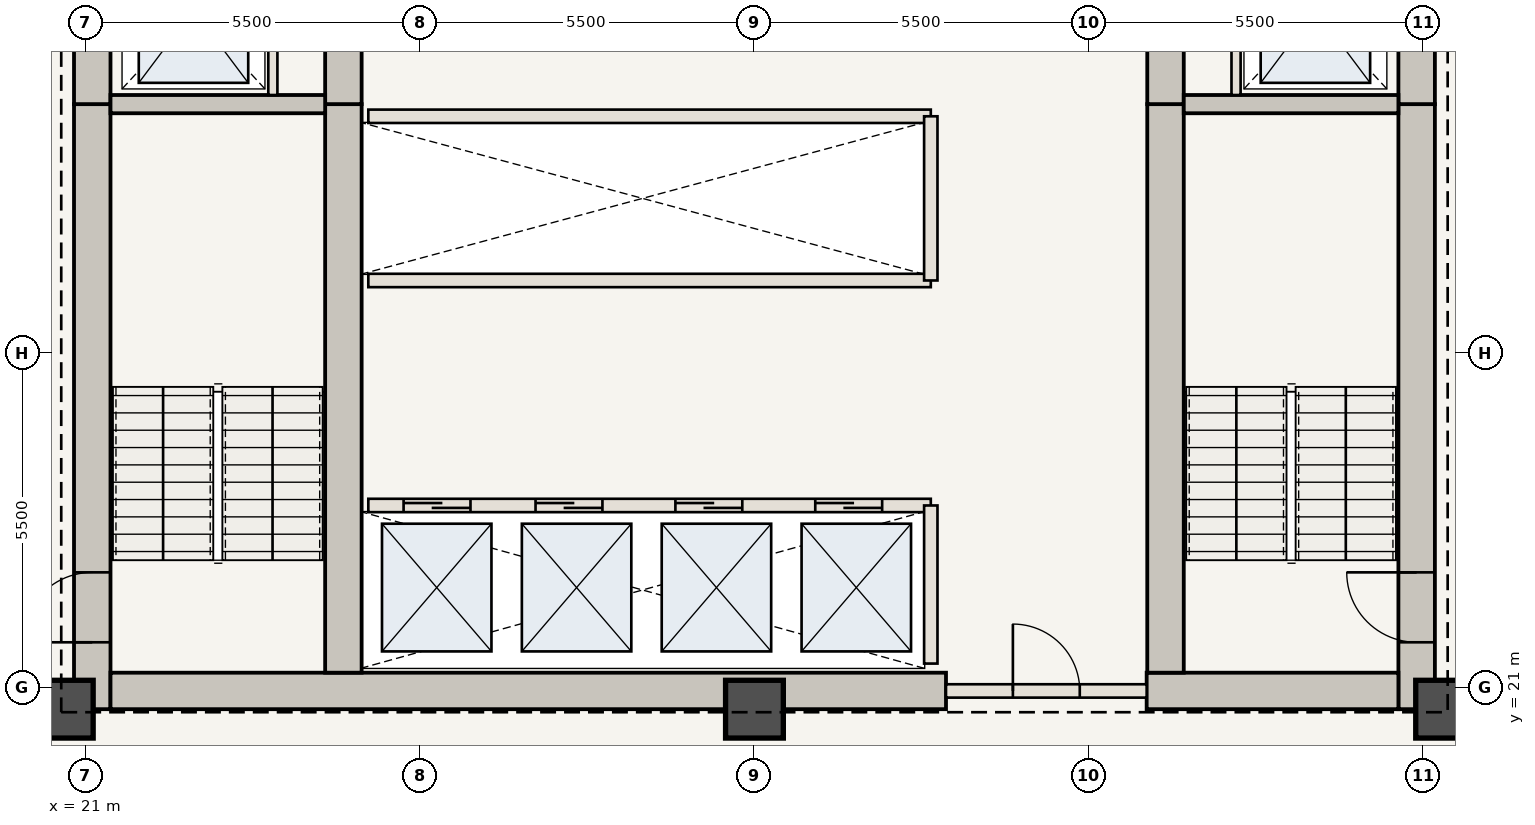
"""IFC4 building model, lengths in metres.
Left out: names, types, materials, properties, quantities, classifications, styles, units other than length and angle.
Written with IfcOpenShell. Run it as: python <this file> out.ifc"""

import sys

from ifc_helpers import new_model, si_unit, direction, frame, frame_2d, origin, origin_2d, place, context, subcontext, project, spatial, rectangle, extrude, element, fill, save


model = new_model("IFC4")
c1 = context("Model", 3, precision=1e-05, world=origin(), true_north=direction((0.0, 1.0)))
c2 = subcontext(c1, "Body", "Model", "MODEL_VIEW")
j1 = project(units=[si_unit("LENGTHUNIT", "METRE"), si_unit("PLANEANGLEUNIT", "RADIAN")], contexts=[c1])
p1 = place(None, origin())
s1 = spatial("IfcSite", under=j1, at=p1, CompositionType="ELEMENT")
p2 = place(p1, origin())
s2 = spatial("IfcBuilding", under=s1, at=p2, CompositionType="ELEMENT")
p3 = place(p2, frame((0.0, 0.0, 168.35)))
s3 = spatial("IfcBuildingStorey", under=s2, at=p3, CompositionType="ELEMENT", Elevation=168.35)
p4 = place(p3, frame((21.11, 20.65, 0.0), z_axis=(0.0, 0.0, 1.0), x_axis=(0.0, 1.0, 0.0)))
e1 = element("IfcWall", 1, at=p4, inside=s3, PredefinedType="SHEAR", context=c2, shape_type="SweptSolid", body=[
    extrude(rectangle(XDim=9.95, YDim=0.6, at=frame_2d((4.975, 0.0))), origin(), (0.0, 0.0, 1.0), 3.85),
])
p5 = place(p4, frame((1.1, 0.0, 0.0)))
e2 = element("IfcOpeningElement", 2, at=p5, cuts=e1, PredefinedType="OPENING", context=c2, shape_type="SweptSolid", body=[
    extrude(rectangle(XDim=1.15, YDim=2.15, at=frame_2d((0.575, 1.075))), frame((0.0, 0.31, 0.0), z_axis=(0.0, -1.0, 0.0), x_axis=(1.0, 0.0, 0.0)), (0.0, 0.0, 1.0), 0.62),
])
p6 = place(p3, frame((21.11, 30.6, 0.0), z_axis=(0.0, 0.0, 1.0), x_axis=(0.0, 1.0, 0.0)))
e3 = element("IfcWall", 3, at=p6, inside=s3, PredefinedType="SHEAR", context=c2, shape_type="SweptSolid", body=[
    extrude(rectangle(XDim=12.7, YDim=0.6, at=frame_2d((6.35, 0.0))), origin(), (0.0, 0.0, 1.0), 3.85),
])
p7 = place(p6, frame((4.2, 0.0, 0.0)))
e4 = element("IfcOpeningElement", 4, at=p7, cuts=e3, PredefinedType="OPENING", context=c2, shape_type="SweptSolid", body=[
    extrude(rectangle(XDim=1.1, YDim=2.15, at=frame_2d((0.55, 1.075))), frame((0.0, 0.31, 0.0), z_axis=(0.0, -1.0, 0.0), x_axis=(1.0, 0.0, 0.0)), (0.0, 0.0, 1.0), 0.62),
])
p8 = place(p6, frame((8.05, 0.0, 0.0)))
e5 = element("IfcOpeningElement", 5, at=p8, cuts=e3, PredefinedType="OPENING", context=c2, shape_type="SweptSolid", body=[
    extrude(rectangle(XDim=0.92, YDim=2.1, at=frame_2d((0.46, 1.05))), frame((0.0, 0.31, 0.0), z_axis=(0.0, -1.0, 0.0), x_axis=(1.0, 0.0, 0.0)), (0.0, 0.0, 1.0), 0.62),
])
p9 = place(p6, frame((9.45, 0.0, 0.0)))
e6 = element("IfcOpeningElement", 6, at=p9, cuts=e3, PredefinedType="OPENING", context=c2, shape_type="SweptSolid", body=[
    extrude(rectangle(XDim=0.88, YDim=2.1, at=frame_2d((0.44, 1.05))), frame((0.0, 0.31, 0.0), z_axis=(0.0, -1.0, 0.0), x_axis=(1.0, 0.0, 0.0)), (0.0, 0.0, 1.0), 0.62),
])
p10 = place(p6, frame((10.85, 0.0, 0.0)))
e7 = element("IfcOpeningElement", 7, at=p10, cuts=e3, PredefinedType="OPENING", context=c2, shape_type="SweptSolid", body=[
    extrude(rectangle(XDim=0.88, YDim=2.1, at=frame_2d((0.44, 1.05))), frame((0.0, 0.31, 0.0), z_axis=(0.0, -1.0, 0.0), x_axis=(1.0, 0.0, 0.0)), (0.0, 0.0, 1.0), 0.62),
])
p11 = place(p3, frame((42.89, 20.65, 0.0), z_axis=(0.0, 0.0, 1.0), x_axis=(0.0, 1.0, 0.0)))
e8 = element("IfcWall", 8, at=p11, inside=s3, PredefinedType="SHEAR", context=c2, shape_type="SweptSolid", body=[
    extrude(rectangle(XDim=9.95, YDim=0.6, at=frame_2d((4.975, 0.0))), origin(), (0.0, 0.0, 1.0), 3.85),
])
p12 = place(p11, frame((1.1, 0.0, 0.0)))
e9 = element("IfcOpeningElement", 9, at=p12, cuts=e8, PredefinedType="OPENING", context=c2, shape_type="SweptSolid", body=[
    extrude(rectangle(XDim=1.15, YDim=2.15, at=frame_2d((0.575, 1.075))), frame((0.0, 0.31, 0.0), z_axis=(0.0, -1.0, 0.0), x_axis=(1.0, 0.0, 0.0)), (0.0, 0.0, 1.0), 0.62),
])
p13 = place(p3, frame((42.89, 30.6, 0.0), z_axis=(0.0, 0.0, 1.0), x_axis=(0.0, 1.0, 0.0)))
e10 = element("IfcWall", 10, at=p13, inside=s3, PredefinedType="SHEAR", context=c2, shape_type="SweptSolid", body=[
    extrude(rectangle(XDim=12.7, YDim=0.6, at=frame_2d((6.35, 0.0))), origin(), (0.0, 0.0, 1.0), 3.85),
])
p14 = place(p13, frame((4.2, 0.0, 0.0)))
e11 = element("IfcOpeningElement", 11, at=p14, cuts=e10, PredefinedType="OPENING", context=c2, shape_type="SweptSolid", body=[
    extrude(rectangle(XDim=1.1, YDim=2.15, at=frame_2d((0.55, 1.075))), frame((0.0, 0.31, 0.0), z_axis=(0.0, -1.0, 0.0), x_axis=(1.0, 0.0, 0.0)), (0.0, 0.0, 1.0), 0.62),
])
p15 = place(p13, frame((9.2, 0.0, 0.0)))
e12 = element("IfcOpeningElement", 12, at=p15, cuts=e10, PredefinedType="OPENING", context=c2, shape_type="SweptSolid", body=[
    extrude(rectangle(XDim=0.92, YDim=2.1, at=frame_2d((0.46, 1.05))), frame((0.0, 0.31, 0.0), z_axis=(0.0, -1.0, 0.0), x_axis=(1.0, 0.0, 0.0)), (0.0, 0.0, 1.0), 0.62),
])
p16 = place(p3, frame((21.41, 20.95, 0.0), z_axis=(0.0, 0.0, 1.0), x_axis=(1.0, 0.0, 0.0)))
e13 = element("IfcWall", 13, at=p16, inside=s3, PredefinedType="SHEAR", context=c2, shape_type="SweptSolid", body=[
    extrude(rectangle(XDim=13.74, YDim=0.6, at=frame_2d((6.87, 0.0))), origin(), (0.0, 0.0, 1.0), 3.85),
])
p17 = place(p3, frame((38.45, 20.95, 0.0), z_axis=(0.0, 0.0, 1.0), x_axis=(1.0, 0.0, 0.0)))
e14 = element("IfcWall", 14, at=p17, inside=s3, PredefinedType="SHEAR", context=c2, shape_type="SweptSolid", body=[
    extrude(rectangle(XDim=4.14, YDim=0.6, at=frame_2d((2.07, 0.0))), origin(), (0.0, 0.0, 1.0), 3.85),
])
p18 = place(p3, frame((25.24, 21.25, 0.0), z_axis=(0.0, 0.0, 1.0), x_axis=(0.0, 1.0, 0.0)))
e15 = element("IfcWall", 15, at=p18, inside=s3, PredefinedType="SHEAR", context=c2, shape_type="SweptSolid", body=[
    extrude(rectangle(XDim=9.35, YDim=0.6, at=frame_2d((4.675, 0.0))), origin(), (0.0, 0.0, 1.0), 3.85),
])
p19 = place(p3, frame((25.24, 30.6, 0.0), z_axis=(0.0, 0.0, 1.0), x_axis=(0.0, 1.0, 0.0)))
e16 = element("IfcWall", 16, at=p19, inside=s3, PredefinedType="SHEAR", context=c2, shape_type="SweptSolid", body=[
    extrude(rectangle(XDim=12.1, YDim=0.6, at=frame_2d((6.05, 0.0))), origin(), (0.0, 0.0, 1.0), 3.85),
])
p20 = place(p19, frame((6.25, 0.0, 0.0)))
e17 = element("IfcOpeningElement", 17, at=p20, cuts=e16, PredefinedType="OPENING", context=c2, shape_type="SweptSolid", body=[
    extrude(rectangle(XDim=1.1, YDim=2.15, at=frame_2d((0.55, 1.075))), frame((0.0, 0.31, 0.0), z_axis=(0.0, -1.0, 0.0), x_axis=(1.0, 0.0, 0.0)), (0.0, 0.0, 1.0), 0.62),
])
p21 = place(p3, frame((38.76, 21.25, 0.0), z_axis=(0.0, 0.0, 1.0), x_axis=(0.0, 1.0, 0.0)))
e18 = element("IfcWall", 18, at=p21, inside=s3, PredefinedType="SHEAR", context=c2, shape_type="SweptSolid", body=[
    extrude(rectangle(XDim=9.35, YDim=0.6, at=frame_2d((4.675, 0.0))), origin(), (0.0, 0.0, 1.0), 3.85),
])
p22 = place(p3, frame((38.76, 30.6, 0.0), z_axis=(0.0, 0.0, 1.0), x_axis=(0.0, 1.0, 0.0)))
e19 = element("IfcWall", 19, at=p22, inside=s3, PredefinedType="SHEAR", context=c2, shape_type="SweptSolid", body=[
    extrude(rectangle(XDim=12.1, YDim=0.6, at=frame_2d((6.05, 0.0))), origin(), (0.0, 0.0, 1.0), 3.85),
])
for number, where, z_axis, x_axis in (
    (20, (20.65, 20.65, 0.0), (0.0, 0.0, 1.0), (1.0, 0.0, 0.0)),
    (21, (32.0, 20.65, 0.0), (0.0, 0.0, 1.0), (1.0, 0.0, 0.0)),
    (22, (43.35, 20.65, 0.0), (0.0, 0.0, 1.0), (1.0, 0.0, 0.0)),
):
    element("IfcColumn", number, at=place(p3, frame(where, z_axis=z_axis, x_axis=x_axis)), inside=s3, PredefinedType="COLUMN", context=c2, shape_type="SweptSolid", body=[
        extrude(rectangle(XDim=0.95, YDim=0.95, at=origin_2d()), origin(), (0.0, 0.0, 1.0), 3.85),
    ])
for number, where, z_axis, x_axis in (
    (23, (21.41, 30.6, 0.0), (0.0, 0.0, 1.0), (1.0, 0.0, 0.0)),
    (24, (39.06, 30.6, 0.0), (0.0, 0.0, 1.0), (1.0, 0.0, 0.0)),
):
    element("IfcWall", number, at=place(p3, frame(where, z_axis=z_axis, x_axis=x_axis)), inside=s3, PredefinedType="SHEAR", context=c2, shape_type="SweptSolid", body=[
        extrude(rectangle(XDim=3.53, YDim=0.3, at=frame_2d((1.765, 0.0))), origin(), (0.0, 0.0, 1.0), 3.685),
    ])
for number, where, z_axis, x_axis in (
    (25, (24.08, 30.75, 0.0), (0.0, 0.0, 1.0), (0.0, 1.0, 0.0)),
    (26, (39.92, 30.75, 0.0), (0.0, 0.0, 1.0), (0.0, 1.0, 0.0)),
):
    element("IfcWall", number, at=place(p3, frame(where, z_axis=z_axis, x_axis=x_axis)), inside=s3, PredefinedType="STANDARD", context=c2, shape_type="SweptSolid", body=[
        extrude(rectangle(XDim=2.65, YDim=0.15, at=frame_2d((1.325, 0.0))), origin(), (0.0, 0.0, 1.0), 3.685),
    ])
p23 = place(p3, frame((35.15, 20.95, 0.0), z_axis=(0.0, 0.0, 1.0), x_axis=(1.0, 0.0, 0.0)))
e27 = element("IfcWall", 27, at=p23, inside=s3, PredefinedType="STANDARD", context=c2, shape_type="SweptSolid", body=[
    extrude(rectangle(XDim=3.3, YDim=0.22, at=frame_2d((1.65, 0.0))), origin(), (0.0, 0.0, 1.0), 3.685),
])
p24 = place(p23, frame((1.1, 0.0, 0.0)))
e28 = element("IfcOpeningElement", 28, at=p24, cuts=e27, PredefinedType="OPENING", context=c2, shape_type="SweptSolid", body=[
    extrude(rectangle(XDim=1.1, YDim=2.15, at=frame_2d((0.55, 1.075))), frame((0.0, 0.12, 0.0), z_axis=(0.0, -1.0, 0.0), x_axis=(1.0, 0.0, 0.0)), (0.0, 0.0, 1.0), 0.24),
])
p25 = place(p3, frame((25.65, 24.0, 0.0), z_axis=(0.0, 0.0, 1.0), x_axis=(1.0, 0.0, 0.0)))
e29 = element("IfcWall", 29, at=p25, inside=s3, PredefinedType="STANDARD", context=c2, shape_type="SweptSolid", body=[
    extrude(rectangle(XDim=9.25, YDim=0.22, at=frame_2d((4.625, 0.0))), origin(), (0.0, 0.0, 1.0), 3.685),
])
p26 = place(p25, frame((0.58, 0.0, 0.0)))
e30 = element("IfcOpeningElement", 30, at=p26, cuts=e29, PredefinedType="OPENING", context=c2, shape_type="SweptSolid", body=[
    extrude(rectangle(XDim=1.1, YDim=2.15, at=frame_2d((0.55, 1.075))), frame((0.0, 0.12, 0.0), z_axis=(0.0, -1.0, 0.0), x_axis=(1.0, 0.0, 0.0)), (0.0, 0.0, 1.0), 0.24),
])
p27 = place(p25, frame((2.75, 0.0, 0.0)))
e31 = element("IfcOpeningElement", 31, at=p27, cuts=e29, PredefinedType="OPENING", context=c2, shape_type="SweptSolid", body=[
    extrude(rectangle(XDim=1.1, YDim=2.15, at=frame_2d((0.55, 1.075))), frame((0.0, 0.12, 0.0), z_axis=(0.0, -1.0, 0.0), x_axis=(1.0, 0.0, 0.0)), (0.0, 0.0, 1.0), 0.24),
])
p28 = place(p25, frame((5.05, 0.0, 0.0)))
e32 = element("IfcOpeningElement", 32, at=p28, cuts=e29, PredefinedType="OPENING", context=c2, shape_type="SweptSolid", body=[
    extrude(rectangle(XDim=1.1, YDim=2.15, at=frame_2d((0.55, 1.075))), frame((0.0, 0.12, 0.0), z_axis=(0.0, -1.0, 0.0), x_axis=(1.0, 0.0, 0.0)), (0.0, 0.0, 1.0), 0.24),
])
p29 = place(p25, frame((7.35, 0.0, 0.0)))
e33 = element("IfcOpeningElement", 33, at=p29, cuts=e29, PredefinedType="OPENING", context=c2, shape_type="SweptSolid", body=[
    extrude(rectangle(XDim=1.1, YDim=2.15, at=frame_2d((0.55, 1.075))), frame((0.0, 0.12, 0.0), z_axis=(0.0, -1.0, 0.0), x_axis=(1.0, 0.0, 0.0)), (0.0, 0.0, 1.0), 0.24),
])
p30 = place(p3, frame((34.9, 21.4, 0.0), z_axis=(0.0, 0.0, 1.0), x_axis=(0.0, 1.0, 0.0)))
e34 = element("IfcWall", 34, at=p30, inside=s3, PredefinedType="STANDARD", context=c2, shape_type="SweptSolid", body=[
    extrude(rectangle(XDim=2.6, YDim=0.22, at=frame_2d((1.3, 0.0))), origin(), (0.0, 0.0, 1.0), 3.685),
])
for number, where, z_axis, x_axis in (
    (35, (25.65, 27.7, 0.0), (0.0, 0.0, 1.0), (1.0, 0.0, 0.0)),
    (36, (25.65, 30.4, 0.0), (0.0, 0.0, 1.0), (1.0, 0.0, 0.0)),
):
    element("IfcWall", number, at=place(p3, frame(where, z_axis=z_axis, x_axis=x_axis)), inside=s3, PredefinedType="STANDARD", context=c2, shape_type="SweptSolid", body=[
        extrude(rectangle(XDim=9.25, YDim=0.22, at=frame_2d((4.625, 0.0))), origin(), (0.0, 0.0, 1.0), 3.685),
    ])
p31 = place(p3, frame((34.9, 27.7, 0.0), z_axis=(0.0, 0.0, 1.0), x_axis=(0.0, 1.0, 0.0)))
e37 = element("IfcWall", 37, at=p31, inside=s3, PredefinedType="STANDARD", context=c2, shape_type="SweptSolid", body=[
    extrude(rectangle(XDim=2.7, YDim=0.22, at=frame_2d((1.35, 0.0))), origin(), (0.0, 0.0, 1.0), 3.685),
])
p32 = place(p5, origin())
e38 = element("IfcDoor", 38, at=p32, inside=s3, OperationType="SINGLE_SWING_LEFT", PredefinedType="DOOR", context=c2, shape_type="SweptSolid", body=[
    extrude(rectangle(XDim=1.15, YDim=2.15, at=frame_2d((0.575, 1.075))), frame((0.0, 0.025, 0.0), z_axis=(0.0, -1.0, 0.0), x_axis=(1.0, 0.0, 0.0)), (0.0, 0.0, 1.0), 0.05),
])
fill(e2, e38)
p33 = place(p12, origin())
e39 = element("IfcDoor", 39, at=p33, inside=s3, OperationType="SINGLE_SWING_RIGHT", PredefinedType="DOOR", context=c2, shape_type="SweptSolid", body=[
    extrude(rectangle(XDim=1.15, YDim=2.15, at=frame_2d((0.575, 1.075))), frame((0.0, 0.025, 0.0), z_axis=(0.0, -1.0, 0.0), x_axis=(1.0, 0.0, 0.0)), (0.0, 0.0, 1.0), 0.05),
])
fill(e9, e39)
p34 = place(p24, origin())
e40 = element("IfcDoor", 40, at=p34, inside=s3, OperationType="SINGLE_SWING_LEFT", PredefinedType="DOOR", context=c2, shape_type="SweptSolid", body=[
    extrude(rectangle(XDim=1.1, YDim=2.15, at=frame_2d((0.55, 1.075))), frame((0.0, 0.025, 0.0), z_axis=(0.0, -1.0, 0.0), x_axis=(1.0, 0.0, 0.0)), (0.0, 0.0, 1.0), 0.05),
])
fill(e28, e40)
p35 = place(p26, origin())
e41 = element("IfcDoor", 41, at=p35, inside=s3, OperationType="DOUBLE_DOOR_SLIDING", PredefinedType="DOOR", context=c2, shape_type="SweptSolid", body=[
    extrude(rectangle(XDim=1.1, YDim=2.15, at=frame_2d((0.55, 1.075))), frame((0.0, 0.025, 0.0), z_axis=(0.0, -1.0, 0.0), x_axis=(1.0, 0.0, 0.0)), (0.0, 0.0, 1.0), 0.05),
])
fill(e30, e41)
p36 = place(p27, origin())
e42 = element("IfcDoor", 42, at=p36, inside=s3, OperationType="DOUBLE_DOOR_SLIDING", PredefinedType="DOOR", context=c2, shape_type="SweptSolid", body=[
    extrude(rectangle(XDim=1.1, YDim=2.15, at=frame_2d((0.55, 1.075))), frame((0.0, 0.025, 0.0), z_axis=(0.0, -1.0, 0.0), x_axis=(1.0, 0.0, 0.0)), (0.0, 0.0, 1.0), 0.05),
])
fill(e31, e42)
p37 = place(p28, origin())
e43 = element("IfcDoor", 43, at=p37, inside=s3, OperationType="DOUBLE_DOOR_SLIDING", PredefinedType="DOOR", context=c2, shape_type="SweptSolid", body=[
    extrude(rectangle(XDim=1.1, YDim=2.15, at=frame_2d((0.55, 1.075))), frame((0.0, 0.025, 0.0), z_axis=(0.0, -1.0, 0.0), x_axis=(1.0, 0.0, 0.0)), (0.0, 0.0, 1.0), 0.05),
])
fill(e32, e43)
p38 = place(p29, origin())
e44 = element("IfcDoor", 44, at=p38, inside=s3, OperationType="DOUBLE_DOOR_SLIDING", PredefinedType="DOOR", context=c2, shape_type="SweptSolid", body=[
    extrude(rectangle(XDim=1.1, YDim=2.15, at=frame_2d((0.55, 1.075))), frame((0.0, 0.025, 0.0), z_axis=(0.0, -1.0, 0.0), x_axis=(1.0, 0.0, 0.0)), (0.0, 0.0, 1.0), 0.05),
])
fill(e33, e44)
save(model, sys.argv[1])
